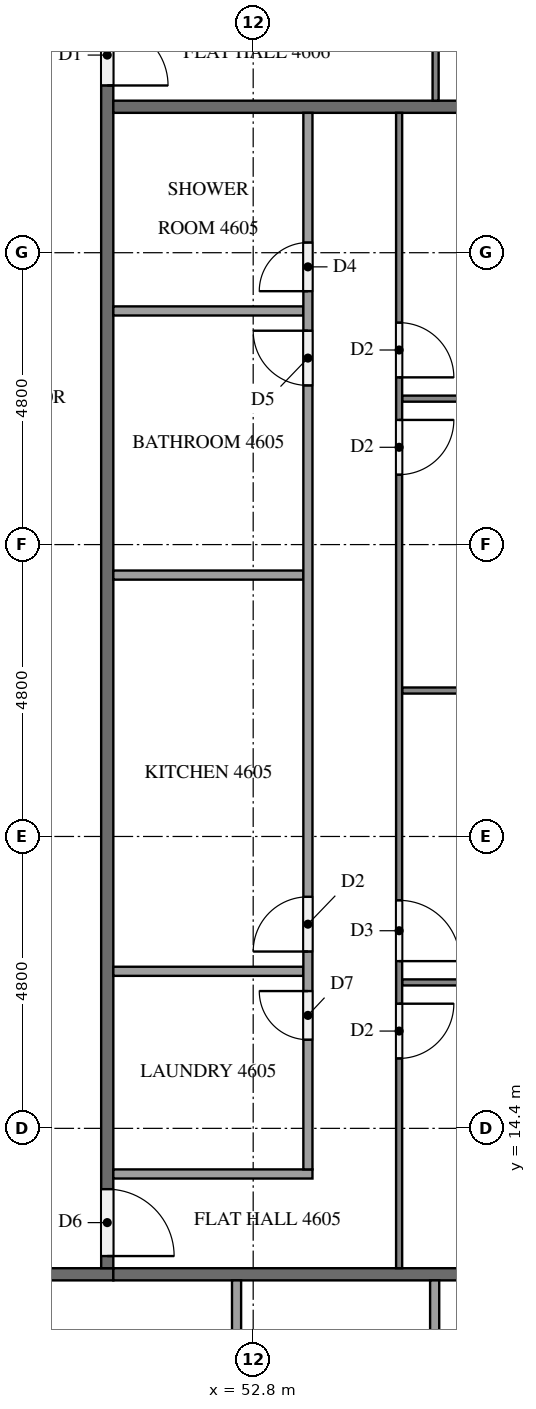
"""IFC4 building model, lengths in metres.
Left out: names, types, materials, properties, quantities, classifications, styles, units other than length and angle.
Written with IfcOpenShell. Run it as: python <this file> out.ifc"""

import sys

from ifc_helpers import new_model, si_unit, direction, frame, frame_2d, origin, place, context, subcontext, project, spatial, rectangle, extrude, element, fill, save


model = new_model("IFC4")
c1 = context("Model", 3, precision=1e-05, world=origin(), true_north=direction((0.0, 1.0)))
c2 = subcontext(c1, "Body", "Model", "MODEL_VIEW")
j1 = project(units=[si_unit("LENGTHUNIT", "METRE"), si_unit("PLANEANGLEUNIT", "RADIAN")], contexts=[c1])
p1 = place(None, origin())
s1 = spatial("IfcSite", under=j1, at=p1, CompositionType="ELEMENT")
p2 = place(p1, origin())
s2 = spatial("IfcBuilding", under=s1, at=p2, CompositionType="ELEMENT")
p3 = place(p2, frame((0.0, 0.0, 178.9)))
s3 = spatial("IfcBuildingStorey", under=s2, at=p3, CompositionType="ELEMENT", Elevation=178.9)
p4 = place(p3, frame((50.5, 12.0, 0.0), z_axis=(0.0, 0.0, 1.0), x_axis=(-1.0, 0.0, 0.0)))
e1 = element("IfcWall", 1, at=p4, inside=s3, PredefinedType="PARTITIONING", context=c2, shape_type="SweptSolid", body=[
    extrude(rectangle(XDim=38.6, YDim=0.2, at=frame_2d((19.3, 0.0))), origin(), (0.0, 0.0, 1.0), 3.2),
])
p5 = place(p4, frame((31.65, 0.0, 0.0)))
e2 = element("IfcOpeningElement", 2, at=p5, cuts=e1, PredefinedType="OPENING", context=c2, shape_type="SweptSolid", body=[
    extrude(rectangle(XDim=1.0, YDim=2.1, at=frame_2d((0.5, 1.05))), frame((0.0, 0.11, 0.0), z_axis=(0.0, -1.0, 0.0), x_axis=(1.0, 0.0, 0.0)), (0.0, 0.0, 1.0), 0.22),
])
p6 = place(p4, frame((17.25, 0.0, 0.0)))
e3 = element("IfcOpeningElement", 3, at=p6, cuts=e1, PredefinedType="OPENING", context=c2, shape_type="SweptSolid", body=[
    extrude(rectangle(XDim=1.0, YDim=2.1, at=frame_2d((0.5, 1.05))), frame((0.0, 0.11, 0.0), z_axis=(0.0, -1.0, 0.0), x_axis=(1.0, 0.0, 0.0)), (0.0, 0.0, 1.0), 0.22),
])
p7 = place(p4, frame((7.65, 0.0, 0.0)))
e4 = element("IfcOpeningElement", 4, at=p7, cuts=e1, PredefinedType="OPENING", context=c2, shape_type="SweptSolid", body=[
    extrude(rectangle(XDim=1.0, YDim=2.1, at=frame_2d((0.5, 1.05))), frame((0.0, 0.11, 0.0), z_axis=(0.0, -1.0, 0.0), x_axis=(1.0, 0.0, 0.0)), (0.0, 0.0, 1.0), 0.22),
])
p8 = place(p4, frame((5.9, 0.0, 0.0)))
e5 = element("IfcOpeningElement", 5, at=p8, cuts=e1, PredefinedType="OPENING", context=c2, shape_type="SweptSolid", body=[
    extrude(rectangle(XDim=1.1, YDim=2.1, at=frame_2d((0.55, 1.05))), frame((0.0, 0.11, 0.0), z_axis=(0.0, -1.0, 0.0), x_axis=(1.0, 0.0, 0.0)), (0.0, 0.0, 1.0), 0.22),
])
p9 = place(p3, frame((50.4, 40.7, 0.0), z_axis=(0.0, 0.0, 1.0), x_axis=(0.0, -1.0, 0.0)))
e6 = element("IfcWall", 6, at=p9, inside=s3, PredefinedType="PARTITIONING", context=c2, shape_type="SweptSolid", body=[
    extrude(rectangle(XDim=28.6, YDim=0.2, at=frame_2d((14.3, 0.0))), origin(), (0.0, 0.0, 1.0), 3.2),
])
p10 = place(p9, frame((27.3, 0.0, 0.0)))
e7 = element("IfcOpeningElement", 7, at=p10, cuts=e6, PredefinedType="OPENING", context=c2, shape_type="SweptSolid", body=[
    extrude(rectangle(XDim=1.1, YDim=2.1, at=frame_2d((0.55, 1.05))), frame((0.0, 0.11, 0.0), z_axis=(0.0, -1.0, 0.0), x_axis=(1.0, 0.0, 0.0)), (0.0, 0.0, 1.0), 0.22),
])
p11 = place(p9, frame((8.15, 0.0, 0.0)))
e8 = element("IfcOpeningElement", 8, at=p11, cuts=e6, PredefinedType="OPENING", context=c2, shape_type="SweptSolid", body=[
    extrude(rectangle(XDim=1.0, YDim=2.1, at=frame_2d((0.5, 1.05))), frame((0.0, 0.11, 0.0), z_axis=(0.0, -1.0, 0.0), x_axis=(1.0, 0.0, 0.0)), (0.0, 0.0, 1.0), 0.22),
])
p12 = place(p9, frame((0.95, 0.0, 0.0)))
e9 = element("IfcOpeningElement", 9, at=p12, cuts=e6, PredefinedType="OPENING", context=c2, shape_type="SweptSolid", body=[
    extrude(rectangle(XDim=1.0, YDim=2.1, at=frame_2d((0.5, 1.05))), frame((0.0, 0.11, 0.0), z_axis=(0.0, -1.0, 0.0), x_axis=(1.0, 0.0, 0.0)), (0.0, 0.0, 1.0), 0.22),
])
for number, where, z_axis, x_axis in (
    (10, (50.5, 12.0, 0.0), (0.0, 0.0, 1.0), (1.0, 0.0, 0.0)),
    (11, (50.5, 31.2, 0.0), (0.0, 0.0, 1.0), (1.0, 0.0, 0.0)),
):
    element("IfcWall", number, at=place(p3, frame(where, z_axis=z_axis, x_axis=x_axis)), inside=s3, PredefinedType="PARTITIONING", context=c2, shape_type="SweptSolid", body=[
        extrude(rectangle(XDim=11.8, YDim=0.2, at=frame_2d((5.9, 0.0))), origin(), (0.0, 0.0, 1.0), 3.2),
    ])
for number, where, z_axis, x_axis in (
    (12, (52.527, 11.9, 0.0), (0.0, 0.0, 1.0), (0.0, -1.0, 0.0)),
    (13, (55.784, 11.9, 0.0), (0.0, 0.0, 1.0), (0.0, -1.0, 0.0)),
):
    element("IfcWall", number, at=place(p3, frame(where, z_axis=z_axis, x_axis=x_axis)), inside=s3, PredefinedType="PARTITIONING", context=c2, shape_type="SweptSolid", body=[
        extrude(rectangle(XDim=4.325, YDim=0.15, at=frame_2d((2.163, 0.0))), origin(), (0.0, 0.0, 1.0), 3.2),
    ])
for number, where, z_axis, x_axis in (
    (14, (55.25, 16.8, 0.0), (0.0, 0.0, 1.0), (1.0, 0.0, 0.0)),
    (15, (55.25, 21.6, 0.0), (0.0, 0.0, 1.0), (1.0, 0.0, 0.0)),
    (16, (55.25, 26.4, 0.0), (0.0, 0.0, 1.0), (1.0, 0.0, 0.0)),
):
    element("IfcWall", number, at=place(p3, frame(where, z_axis=z_axis, x_axis=x_axis)), inside=s3, PredefinedType="PARTITIONING", context=c2, shape_type="SweptSolid", body=[
        extrude(rectangle(XDim=7.05, YDim=0.1, at=frame_2d((3.525, 0.0))), origin(), (0.0, 0.0, 1.0), 3.2),
    ])
p13 = place(p3, frame((55.2, 31.1, 0.0), z_axis=(0.0, 0.0, 1.0), x_axis=(0.0, -1.0, 0.0)))
e17 = element("IfcWall", 17, at=p13, inside=s3, PredefinedType="PARTITIONING", context=c2, shape_type="SweptSolid", body=[
    extrude(rectangle(XDim=19.0, YDim=0.1, at=frame_2d((9.5, 0.0))), origin(), (0.0, 0.0, 1.0), 3.2),
])
p14 = place(p13, frame((14.65, 0.0, 0.0)))
e18 = element("IfcOpeningElement", 18, at=p14, cuts=e17, PredefinedType="OPENING", context=c2, shape_type="SweptSolid", body=[
    extrude(rectangle(XDim=0.9, YDim=2.1, at=frame_2d((0.45, 1.05))), frame((0.0, 0.06, 0.0), z_axis=(0.0, -1.0, 0.0), x_axis=(1.0, 0.0, 0.0)), (0.0, 0.0, 1.0), 0.12),
])
p15 = place(p13, frame((12.95, 0.0, 0.0)))
e19 = element("IfcOpeningElement", 19, at=p15, cuts=e17, PredefinedType="OPENING", context=c2, shape_type="SweptSolid", body=[
    extrude(rectangle(XDim=1.0, YDim=2.1, at=frame_2d((0.5, 1.05))), frame((0.0, 0.06, 0.0), z_axis=(0.0, -1.0, 0.0), x_axis=(1.0, 0.0, 0.0)), (0.0, 0.0, 1.0), 0.12),
])
p16 = place(p13, frame((5.05, 0.0, 0.0)))
e20 = element("IfcOpeningElement", 20, at=p16, cuts=e17, PredefinedType="OPENING", context=c2, shape_type="SweptSolid", body=[
    extrude(rectangle(XDim=0.9, YDim=2.1, at=frame_2d((0.45, 1.05))), frame((0.0, 0.06, 0.0), z_axis=(0.0, -1.0, 0.0), x_axis=(1.0, 0.0, 0.0)), (0.0, 0.0, 1.0), 0.12),
])
p17 = place(p13, frame((3.45, 0.0, 0.0)))
e21 = element("IfcOpeningElement", 21, at=p17, cuts=e17, PredefinedType="OPENING", context=c2, shape_type="SweptSolid", body=[
    extrude(rectangle(XDim=0.9, YDim=2.1, at=frame_2d((0.45, 1.05))), frame((0.0, 0.06, 0.0), z_axis=(0.0, -1.0, 0.0), x_axis=(1.0, 0.0, 0.0)), (0.0, 0.0, 1.0), 0.12),
])
for number, where, z_axis, x_axis in (
    (22, (50.5, 16.983, 0.0), (0.0, 0.0, 1.0), (1.0, 0.0, 0.0)),
    (23, (50.5, 23.498, 0.0), (0.0, 0.0, 1.0), (1.0, 0.0, 0.0)),
    (24, (50.5, 27.842, 0.0), (0.0, 0.0, 1.0), (1.0, 0.0, 0.0)),
):
    element("IfcWall", number, at=place(p3, frame(where, z_axis=z_axis, x_axis=x_axis)), inside=s3, PredefinedType="PARTITIONING", context=c2, shape_type="SweptSolid", body=[
        extrude(rectangle(XDim=3.125, YDim=0.15, at=frame_2d((1.562, 0.0))), origin(), (0.0, 0.0, 1.0), 3.2),
    ])
p18 = place(p3, frame((50.5, 13.65, 0.0), z_axis=(0.0, 0.0, 1.0), x_axis=(1.0, 0.0, 0.0)))
e25 = element("IfcWall", 25, at=p18, inside=s3, PredefinedType="PARTITIONING", context=c2, shape_type="SweptSolid", body=[
    extrude(rectangle(XDim=3.275, YDim=0.15, at=frame_2d((1.637, 0.0))), origin(), (0.0, 0.0, 1.0), 3.2),
])
p19 = place(p3, frame((53.7, 13.725, 0.0), z_axis=(0.0, 0.0, 1.0), x_axis=(0.0, 1.0, 0.0)))
e26 = element("IfcWall", 26, at=p19, inside=s3, PredefinedType="PARTITIONING", context=c2, shape_type="SweptSolid", body=[
    extrude(rectangle(XDim=17.375, YDim=0.15, at=frame_2d((8.688, 0.0))), origin(), (0.0, 0.0, 1.0), 3.2),
])
p20 = place(p19, frame((2.133, 0.0, 0.0)))
e27 = element("IfcOpeningElement", 27, at=p20, cuts=e26, PredefinedType="OPENING", context=c2, shape_type="SweptSolid", body=[
    extrude(rectangle(XDim=0.8, YDim=2.1, at=frame_2d((0.4, 1.05))), frame((0.0, 0.085, 0.0), z_axis=(0.0, -1.0, 0.0), x_axis=(1.0, 0.0, 0.0)), (0.0, 0.0, 1.0), 0.17),
])
p21 = place(p19, frame((3.583, 0.0, 0.0)))
e28 = element("IfcOpeningElement", 28, at=p21, cuts=e26, PredefinedType="OPENING", context=c2, shape_type="SweptSolid", body=[
    extrude(rectangle(XDim=0.9, YDim=2.1, at=frame_2d((0.45, 1.05))), frame((0.0, 0.085, 0.0), z_axis=(0.0, -1.0, 0.0), x_axis=(1.0, 0.0, 0.0)), (0.0, 0.0, 1.0), 0.17),
])
p22 = place(p19, frame((12.892, 0.0, 0.0)))
e29 = element("IfcOpeningElement", 29, at=p22, cuts=e26, PredefinedType="OPENING", context=c2, shape_type="SweptSolid", body=[
    extrude(rectangle(XDim=0.9, YDim=2.1, at=frame_2d((0.45, 1.05))), frame((0.0, 0.085, 0.0), z_axis=(0.0, -1.0, 0.0), x_axis=(1.0, 0.0, 0.0)), (0.0, 0.0, 1.0), 0.17),
])
p23 = place(p19, frame((14.442, 0.0, 0.0)))
e30 = element("IfcOpeningElement", 30, at=p23, cuts=e26, PredefinedType="OPENING", context=c2, shape_type="SweptSolid", body=[
    extrude(rectangle(XDim=0.8, YDim=2.1, at=frame_2d((0.4, 1.05))), frame((0.0, 0.085, 0.0), z_axis=(0.0, -1.0, 0.0), x_axis=(1.0, 0.0, 0.0)), (0.0, 0.0, 1.0), 0.17),
])
p24 = place(p3, frame((55.8, 38.3, 0.0), z_axis=(0.0, 0.0, 1.0), x_axis=(0.0, -1.0, 0.0)))
e31 = element("IfcWall", 31, at=p24, inside=s3, PredefinedType="PARTITIONING", context=c2, shape_type="SweptSolid", body=[
    extrude(rectangle(XDim=7.0, YDim=0.1, at=frame_2d((3.5, 0.0))), origin(), (0.0, 0.0, 1.0), 3.2),
])
p25 = place(p24, frame((0.3, 0.0, 0.0)))
e32 = element("IfcOpeningElement", 32, at=p25, cuts=e31, PredefinedType="OPENING", context=c2, shape_type="SweptSolid", body=[
    extrude(rectangle(XDim=1.0, YDim=2.1, at=frame_2d((0.5, 1.05))), frame((0.0, 0.06, 0.0), z_axis=(0.0, -1.0, 0.0), x_axis=(1.0, 0.0, 0.0)), (0.0, 0.0, 1.0), 0.12),
])
p26 = place(p10, origin())
e33 = element("IfcDoor", 33, at=p26, inside=s3, OperationType="SINGLE_SWING_RIGHT", PredefinedType="DOOR", context=c2, shape_type="SweptSolid", body=[
    extrude(rectangle(XDim=1.1, YDim=2.1, at=frame_2d((0.55, 1.05))), frame((0.0, 0.025, 0.0), z_axis=(0.0, -1.0, 0.0), x_axis=(1.0, 0.0, 0.0)), (0.0, 0.0, 1.0), 0.05),
])
fill(e7, e33)
p27 = place(p11, origin())
e34 = element("IfcDoor", 34, at=p27, inside=s3, OperationType="SINGLE_SWING_RIGHT", PredefinedType="DOOR", context=c2, shape_type="SweptSolid", body=[
    extrude(rectangle(XDim=1.0, YDim=2.1, at=frame_2d((0.5, 1.05))), frame((0.0, 0.025, 0.0), z_axis=(0.0, -1.0, 0.0), x_axis=(1.0, 0.0, 0.0)), (0.0, 0.0, 1.0), 0.05),
])
fill(e8, e34)
p28 = place(p14, origin())
e35 = element("IfcDoor", 35, at=p28, inside=s3, OperationType="SINGLE_SWING_LEFT", PredefinedType="DOOR", context=c2, shape_type="SweptSolid", body=[
    extrude(rectangle(XDim=0.9, YDim=2.1, at=frame_2d((0.45, 1.05))), frame((0.0, 0.025, 0.0), z_axis=(0.0, -1.0, 0.0), x_axis=(1.0, 0.0, 0.0)), (0.0, 0.0, 1.0), 0.05),
])
fill(e18, e35)
p29 = place(p15, origin())
e36 = element("IfcDoor", 36, at=p29, inside=s3, OperationType="SINGLE_SWING_RIGHT", PredefinedType="DOOR", context=c2, shape_type="SweptSolid", body=[
    extrude(rectangle(XDim=1.0, YDim=2.1, at=frame_2d((0.5, 1.05))), frame((0.0, 0.025, 0.0), z_axis=(0.0, -1.0, 0.0), x_axis=(1.0, 0.0, 0.0)), (0.0, 0.0, 1.0), 0.05),
])
fill(e19, e36)
p30 = place(p16, origin())
e37 = element("IfcDoor", 37, at=p30, inside=s3, OperationType="SINGLE_SWING_LEFT", PredefinedType="DOOR", context=c2, shape_type="SweptSolid", body=[
    extrude(rectangle(XDim=0.9, YDim=2.1, at=frame_2d((0.45, 1.05))), frame((0.0, 0.025, 0.0), z_axis=(0.0, -1.0, 0.0), x_axis=(1.0, 0.0, 0.0)), (0.0, 0.0, 1.0), 0.05),
])
fill(e20, e37)
p31 = place(p17, origin())
e38 = element("IfcDoor", 38, at=p31, inside=s3, OperationType="SINGLE_SWING_RIGHT", PredefinedType="DOOR", context=c2, shape_type="SweptSolid", body=[
    extrude(rectangle(XDim=0.9, YDim=2.1, at=frame_2d((0.45, 1.05))), frame((0.0, 0.025, 0.0), z_axis=(0.0, -1.0, 0.0), x_axis=(1.0, 0.0, 0.0)), (0.0, 0.0, 1.0), 0.05),
])
fill(e21, e38)
p32 = place(p20, origin())
e39 = element("IfcDoor", 39, at=p32, inside=s3, OperationType="SINGLE_SWING_RIGHT", PredefinedType="DOOR", context=c2, shape_type="SweptSolid", body=[
    extrude(rectangle(XDim=0.8, YDim=2.1, at=frame_2d((0.4, 1.05))), frame((0.0, 0.025, 0.0), z_axis=(0.0, -1.0, 0.0), x_axis=(1.0, 0.0, 0.0)), (0.0, 0.0, 1.0), 0.05),
])
fill(e27, e39)
p33 = place(p21, origin())
e40 = element("IfcDoor", 40, at=p33, inside=s3, OperationType="SINGLE_SWING_LEFT", PredefinedType="DOOR", context=c2, shape_type="SweptSolid", body=[
    extrude(rectangle(XDim=0.9, YDim=2.1, at=frame_2d((0.45, 1.05))), frame((0.0, 0.025, 0.0), z_axis=(0.0, -1.0, 0.0), x_axis=(1.0, 0.0, 0.0)), (0.0, 0.0, 1.0), 0.05),
])
fill(e28, e40)
p34 = place(p22, origin())
e41 = element("IfcDoor", 41, at=p34, inside=s3, OperationType="SINGLE_SWING_RIGHT", PredefinedType="DOOR", context=c2, shape_type="SweptSolid", body=[
    extrude(rectangle(XDim=0.9, YDim=2.1, at=frame_2d((0.45, 1.05))), frame((0.0, 0.025, 0.0), z_axis=(0.0, -1.0, 0.0), x_axis=(1.0, 0.0, 0.0)), (0.0, 0.0, 1.0), 0.05),
])
fill(e29, e41)
p35 = place(p23, origin())
e42 = element("IfcDoor", 42, at=p35, inside=s3, OperationType="SINGLE_SWING_LEFT", PredefinedType="DOOR", context=c2, shape_type="SweptSolid", body=[
    extrude(rectangle(XDim=0.8, YDim=2.1, at=frame_2d((0.4, 1.05))), frame((0.0, 0.025, 0.0), z_axis=(0.0, -1.0, 0.0), x_axis=(1.0, 0.0, 0.0)), (0.0, 0.0, 1.0), 0.05),
])
fill(e30, e42)
save(model, sys.argv[1])
